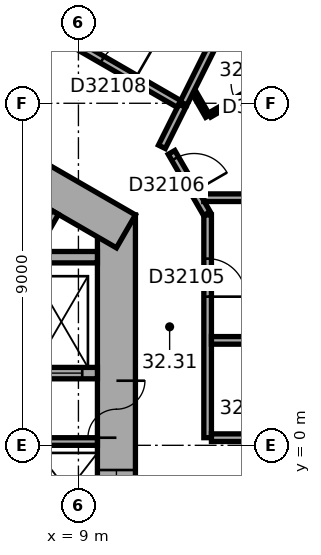
"""IFC4 building model, lengths in metres.
Left out: names, types, materials, properties, quantities, classifications, styles, units other than length and angle.
Written with IfcOpenShell. Run it as: python <this file> out.ifc"""

import sys

from ifc_helpers import new_model, si_unit, direction, frame, frame_2d, origin, place, context, subcontext, project, spatial, rectangle, extrude, element, fill, save


model = new_model("IFC4")
c1 = context("Model", 3, precision=1e-05, world=origin(), true_north=direction((0.0, 1.0)))
c2 = subcontext(c1, "Body", "Model", "MODEL_VIEW")
j1 = project(units=[si_unit("LENGTHUNIT", "METRE"), si_unit("PLANEANGLEUNIT", "RADIAN")], contexts=[c1])
p1 = place(None, origin())
s1 = spatial("IfcSite", under=j1, at=p1, CompositionType="ELEMENT")
p2 = place(p1, origin())
s2 = spatial("IfcBuilding", under=s1, at=p2, CompositionType="ELEMENT")
p3 = place(p2, frame((0.0, 0.0, 131.8)))
s3 = spatial("IfcBuildingStorey", under=s2, at=p3, CompositionType="ELEMENT", Elevation=131.8)
p4 = place(p3, frame((10.0, -6.062, 0.0), z_axis=(0.0, 0.0, 1.0), x_axis=(0.0, 1.0, 0.0)))
e1 = element("IfcWall", 1, at=p4, inside=s3, PredefinedType="SHEAR", context=c2, shape_type="SweptSolid", body=[
    extrude(rectangle(XDim=12.125, YDim=1.0, at=frame_2d((6.062, 0.0))), origin(), (0.0, 0.0, 1.0), 3.7),
])
p5 = place(p4, frame((6.262, 0.0, 0.0)))
e2 = element("IfcOpeningElement", 2, at=p5, cuts=e1, PredefinedType="OPENING", context=c2, shape_type="SweptSolid", body=[
    extrude(rectangle(XDim=1.5, YDim=2.1, at=frame_2d((0.75, 1.05))), frame((0.0, 0.51, 0.0), z_axis=(0.0, -1.0, 0.0), x_axis=(1.0, 0.0, 0.0)), (0.0, 0.0, 1.0), 1.02),
])
p6 = place(p4, frame((1.712, 0.0, 0.0)))
e3 = element("IfcOpeningElement", 3, at=p6, cuts=e1, PredefinedType="OPENING", context=c2, shape_type="SweptSolid", body=[
    extrude(rectangle(XDim=1.1, YDim=2.1, at=frame_2d((0.55, 1.05))), frame((0.0, 0.51, 0.0), z_axis=(0.0, -1.0, 0.0), x_axis=(1.0, 0.0, 0.0)), (0.0, 0.0, 1.0), 1.02),
])
p7 = place(p4, frame((4.312, 0.0, 0.0)))
e4 = element("IfcOpeningElement", 4, at=p7, cuts=e1, PredefinedType="OPENING", context=c2, shape_type="SweptSolid", body=[
    extrude(rectangle(XDim=1.1, YDim=2.1, at=frame_2d((0.55, 1.05))), frame((0.0, 0.51, 0.0), z_axis=(0.0, -1.0, 0.0), x_axis=(1.0, 0.0, 0.0)), (0.0, 0.0, 1.0), 1.02),
])
p8 = place(p3, frame((10.25, 5.629, 0.0), z_axis=(0.0, 0.0, 1.0), x_axis=(-0.866022616891, 0.50000482701, 0.0)))
e5 = element("IfcWall", 5, at=p8, inside=s3, PredefinedType="SHEAR", context=c2, shape_type="SweptSolid", body=[
    extrude(rectangle(XDim=12.125, YDim=1.0, at=frame_2d((6.062, 0.0))), origin(), (0.0, 0.0, 1.0), 3.7),
])
p9 = place(p8, frame((2.612, 0.0, 0.0)))
e6 = element("IfcOpeningElement", 6, at=p9, cuts=e5, PredefinedType="OPENING", context=c2, shape_type="SweptSolid", body=[
    extrude(rectangle(XDim=1.1, YDim=2.1, at=frame_2d((0.55, 1.05))), frame((0.0, 0.51, 0.0), z_axis=(0.0, -1.0, 0.0), x_axis=(1.0, 0.0, 0.0)), (0.0, 0.0, 1.0), 1.02),
])
p10 = place(p8, frame((5.212, 0.0, 0.0)))
e7 = element("IfcOpeningElement", 7, at=p10, cuts=e5, PredefinedType="OPENING", context=c2, shape_type="SweptSolid", body=[
    extrude(rectangle(XDim=1.1, YDim=2.1, at=frame_2d((0.55, 1.05))), frame((0.0, 0.51, 0.0), z_axis=(0.0, -1.0, 0.0), x_axis=(1.0, 0.0, 0.0)), (0.0, 0.0, 1.0), 1.02),
])
p11 = place(p8, frame((7.812, 0.0, 0.0)))
e8 = element("IfcOpeningElement", 8, at=p11, cuts=e5, PredefinedType="OPENING", context=c2, shape_type="SweptSolid", body=[
    extrude(rectangle(XDim=1.1, YDim=2.1, at=frame_2d((0.55, 1.05))), frame((0.0, 0.51, 0.0), z_axis=(0.0, -1.0, 0.0), x_axis=(1.0, 0.0, 0.0)), (0.0, 0.0, 1.0), 1.02),
])
for number, where, z_axis, x_axis in (
    (9, (7.3, 0.1, 0.0), (0.0, 0.0, 1.0), (1.0, 0.0, 0.0)),
    (10, (7.287, 4.222, 0.0), (0.0, 0.0, 1.0), (0.5, 0.866, 0.0)),
):
    element("IfcWall", number, at=place(p3, frame(where, z_axis=z_axis, x_axis=x_axis)), inside=s3, PredefinedType="PARTITIONING", context=c2, shape_type="SweptSolid", body=[
        extrude(rectangle(XDim=2.2, YDim=0.2, at=frame_2d((1.1, 0.0))), origin(), (0.0, 0.0, 1.0), 3.42),
    ])
p12 = place(p3, frame((7.3, 1.9, 0.0), z_axis=(0.0, 0.0, 1.0), x_axis=(1.0, 0.0, 0.0)))
e11 = element("IfcWall", 11, at=p12, inside=s3, PredefinedType="SHEAR", context=c2, shape_type="SweptSolid", body=[
    extrude(rectangle(XDim=2.2, YDim=0.3, at=frame_2d((1.1, 0.0))), origin(), (0.0, 0.0, 1.0), 3.42),
])
p13 = place(p12, frame((0.7, 0.0, 0.0)))
e12 = element("IfcOpeningElement", 12, at=p13, cuts=e11, PredefinedType="OPENING", context=c2, shape_type="SweptSolid", body=[
    extrude(rectangle(XDim=1.1, YDim=2.1, at=frame_2d((0.55, 1.05))), frame((0.0, 0.16, 0.0), z_axis=(0.0, -1.0, 0.0), x_axis=(1.0, 0.0, 0.0)), (0.0, 0.0, 1.0), 0.32),
])
p14 = place(p3, frame((7.3, 4.95, 0.0), z_axis=(0.0, 0.0, 1.0), x_axis=(1.0, 0.0, 0.0)))
e13 = element("IfcWall", 13, at=p14, inside=s3, PredefinedType="SHEAR", context=c2, shape_type="SweptSolid", body=[
    extrude(rectangle(XDim=2.2, YDim=0.3, at=frame_2d((1.1, 0.0))), origin(), (0.0, 0.0, 1.0), 3.42),
])
p15 = place(p3, frame((11.196, 7.854, 0.0), z_axis=(0.0, 0.0, 1.0), x_axis=(0.446241040303, 0.894912808015, 0.0)))
e14 = element("IfcWall", 14, at=p15, inside=s3, PredefinedType="PARTITIONING", context=c2, shape_type="SweptSolid", body=[
    extrude(rectangle(XDim=1.205, YDim=0.2, at=frame_2d((0.603, 0.0))), origin(), (0.0, 0.0, 1.0), 3.42),
])
p16 = place(p3, frame((11.646, 8.981, 0.0), z_axis=(0.0, 0.0, 1.0), x_axis=(-0.866027142779, 0.499996987961, 0.0)))
e15 = element("IfcWall", 15, at=p16, inside=s3, PredefinedType="PARTITIONING", context=c2, shape_type="SweptSolid", body=[
    extrude(rectangle(XDim=9.597, YDim=0.2, at=frame_2d((4.798, 0.0))), origin(), (0.0, 0.0, 1.0), 3.42),
])
p17 = place(p16, frame((1.331, 0.0, 0.0)))
e16 = element("IfcOpeningElement", 16, at=p17, cuts=e15, PredefinedType="OPENING", context=c2, shape_type="SweptSolid", body=[
    extrude(rectangle(XDim=1.0, YDim=2.1, at=frame_2d((0.5, 1.05))), frame((0.0, 0.11, 0.0), z_axis=(0.0, -1.0, 0.0), x_axis=(1.0, 0.0, 0.0)), (0.0, 0.0, 1.0), 0.22),
])
p18 = place(p16, frame((5.042, 0.0, 0.0)))
e17 = element("IfcOpeningElement", 17, at=p18, cuts=e15, PredefinedType="OPENING", context=c2, shape_type="SweptSolid", body=[
    extrude(rectangle(XDim=1.0, YDim=2.1, at=frame_2d((0.5, 1.05))), frame((0.0, 0.11, 0.0), z_axis=(0.0, -1.0, 0.0), x_axis=(1.0, 0.0, 0.0)), (0.0, 0.0, 1.0), 0.22),
])
p19 = place(p16, frame((8.01, 0.0, 0.0)))
e18 = element("IfcOpeningElement", 18, at=p19, cuts=e15, PredefinedType="OPENING", context=c2, shape_type="SweptSolid", body=[
    extrude(rectangle(XDim=1.0, YDim=2.1, at=frame_2d((0.5, 1.05))), frame((0.0, 0.11, 0.0), z_axis=(0.0, -1.0, 0.0), x_axis=(1.0, 0.0, 0.0)), (0.0, 0.0, 1.0), 0.22),
])
p20 = place(p3, frame((12.38, 6.097, 0.0), z_axis=(0.0, 0.0, 1.0), x_axis=(-0.499964847546, 0.866045698112, 0.0)))
e19 = element("IfcWall", 19, at=p20, inside=s3, PredefinedType="PARTITIONING", context=c2, shape_type="SweptSolid", body=[
    extrude(rectangle(XDim=1.86, YDim=0.2, at=frame_2d((0.93, 0.0))), origin(), (0.0, 0.0, 1.0), 3.42),
])
p21 = place(p20, frame((0.672, 0.0, 0.0)))
e20 = element("IfcOpeningElement", 20, at=p21, cuts=e19, PredefinedType="OPENING", context=c2, shape_type="SweptSolid", body=[
    extrude(rectangle(XDim=1.0, YDim=2.1, at=frame_2d((0.5, 1.05))), frame((0.0, 0.11, 0.0), z_axis=(0.0, -1.0, 0.0), x_axis=(1.0, 0.0, 0.0)), (0.0, 0.0, 1.0), 0.22),
])
p22 = place(p3, frame((12.4, 0.201, 0.0), z_axis=(0.0, 0.0, 1.0), x_axis=(0.0, 1.0, 0.0)))
e21 = element("IfcWall", 21, at=p22, inside=s3, PredefinedType="PARTITIONING", context=c2, shape_type="SweptSolid", body=[
    extrude(rectangle(XDim=5.861, YDim=0.2, at=frame_2d((2.931, 0.0))), origin(), (0.0, 0.0, 1.0), 3.42),
])
p23 = place(p22, frame((3.711, 0.0, 0.0)))
e22 = element("IfcOpeningElement", 22, at=p23, cuts=e21, PredefinedType="OPENING", context=c2, shape_type="SweptSolid", body=[
    extrude(rectangle(XDim=1.0, YDim=2.1, at=frame_2d((0.5, 1.05))), frame((0.0, 0.11, 0.0), z_axis=(0.0, -1.0, 0.0), x_axis=(1.0, 0.0, 0.0)), (0.0, 0.0, 1.0), 0.22),
])
p24 = place(p3, frame((12.401, 8.661, 0.0), z_axis=(0.0, 0.0, 1.0), x_axis=(-0.499831418649, 0.866122712398, 0.0)))
e23 = element("IfcWall", 23, at=p24, inside=s3, PredefinedType="PARTITIONING", context=c2, shape_type="SweptSolid", body=[
    extrude(rectangle(XDim=0.711, YDim=0.12, at=frame_2d((0.355, 0.0))), origin(), (0.0, 0.0, 1.0), 3.42),
])
p25 = place(p3, frame((13.501, 0.201, 0.0), z_axis=(0.0, 0.0, 1.0), x_axis=(-1.0, 0.0, 0.0)))
e24 = element("IfcWall", 24, at=p25, inside=s3, PredefinedType="PARTITIONING", context=c2, shape_type="SweptSolid", body=[
    extrude(rectangle(XDim=1.001, YDim=0.2, at=frame_2d((0.5, 0.0))), origin(), (0.0, 0.0, 1.0), 3.42),
])
p26 = place(p3, frame((14.601, 9.931, 0.0), z_axis=(0.0, 0.0, 1.0), x_axis=(-0.866023285932, -0.50000366821, 0.0)))
e25 = element("IfcWall", 25, at=p26, inside=s3, PredefinedType="PARTITIONING", context=c2, shape_type="SweptSolid", body=[
    extrude(rectangle(XDim=2.48, YDim=0.12, at=frame_2d((1.24, 0.0))), origin(), (0.0, 0.0, 1.0), 3.42),
])
p27 = place(p26, frame((0.79, 0.0, 0.0)))
e26 = element("IfcOpeningElement", 26, at=p27, cuts=e25, PredefinedType="OPENING", context=c2, shape_type="SweptSolid", body=[
    extrude(rectangle(XDim=0.9, YDim=2.1, at=frame_2d((0.45, 1.05))), frame((0.0, 0.07, 0.0), z_axis=(0.0, -1.0, 0.0), x_axis=(1.0, 0.0, 0.0)), (0.0, 0.0, 1.0), 0.14),
])
p28 = place(p3, frame((15.09, 15.663, 0.0), z_axis=(0.0, 0.0, 1.0), x_axis=(-0.446203977428, -0.89493128816, 0.0)))
e27 = element("IfcWall", 27, at=p28, inside=s3, PredefinedType="PARTITIONING", context=c2, shape_type="SweptSolid", body=[
    extrude(rectangle(XDim=7.45, YDim=0.2, at=frame_2d((3.725, 0.0))), origin(), (0.0, 0.0, 1.0), 3.42),
])
p29 = place(p3, frame((20.75, 2.761, 0.0), z_axis=(0.0, 0.0, 1.0), x_axis=(-1.0, 0.0, 0.0)))
e28 = element("IfcWall", 28, at=p29, inside=s3, PredefinedType="PARTITIONING", context=c2, shape_type="SweptSolid", body=[
    extrude(rectangle(XDim=8.25, YDim=0.2, at=frame_2d((4.125, 0.0))), origin(), (0.0, 0.0, 1.0), 3.42),
])
p30 = place(p3, frame((20.75, 6.515, 0.0), z_axis=(0.0, 0.0, 1.0), x_axis=(-1.0, 0.0, 0.0)))
e29 = element("IfcWall", 29, at=p30, inside=s3, PredefinedType="PARTITIONING", context=c2, shape_type="SweptSolid", body=[
    extrude(rectangle(XDim=8.452, YDim=0.2, at=frame_2d((4.226, 0.0))), origin(), (0.0, 0.0, 1.0), 3.42),
])
p31 = place(p5, origin())
e30 = element("IfcDoor", 30, at=p31, inside=s3, OperationType="DOUBLE_DOOR_SINGLE_SWING", PredefinedType="DOOR", context=c2, shape_type="SweptSolid", body=[
    extrude(rectangle(XDim=1.5, YDim=2.1, at=frame_2d((0.75, 1.05))), frame((0.0, 0.025, 0.0), z_axis=(0.0, -1.0, 0.0), x_axis=(1.0, 0.0, 0.0)), (0.0, 0.0, 1.0), 0.05),
])
fill(e2, e30)
p32 = place(p13, origin())
e31 = element("IfcDoor", 31, at=p32, inside=s3, OperationType="DOUBLE_DOOR_SLIDING", PredefinedType="DOOR", context=c2, shape_type="SweptSolid", body=[
    extrude(rectangle(XDim=1.1, YDim=2.1, at=frame_2d((0.55, 1.05))), frame((0.0, 0.025, 0.0), z_axis=(0.0, -1.0, 0.0), x_axis=(1.0, 0.0, 0.0)), (0.0, 0.0, 1.0), 0.05),
])
fill(e12, e31)
p33 = place(p7, origin())
e32 = element("IfcDoor", 32, at=p33, inside=s3, OperationType="DOUBLE_DOOR_SLIDING", PredefinedType="DOOR", context=c2, shape_type="SweptSolid", body=[
    extrude(rectangle(XDim=1.1, YDim=2.1, at=frame_2d((0.55, 1.05))), frame((0.0, 0.025, 0.0), z_axis=(0.0, -1.0, 0.0), x_axis=(1.0, 0.0, 0.0)), (0.0, 0.0, 1.0), 0.05),
])
fill(e4, e32)
p34 = place(p23, origin())
e33 = element("IfcDoor", 33, at=p34, inside=s3, OperationType="SINGLE_SWING_LEFT", PredefinedType="DOOR", context=c2, shape_type="SweptSolid", body=[
    extrude(rectangle(XDim=1.0, YDim=2.1, at=frame_2d((0.5, 1.05))), frame((0.0, 0.025, 0.0), z_axis=(0.0, -1.0, 0.0), x_axis=(1.0, 0.0, 0.0)), (0.0, 0.0, 1.0), 0.05),
])
fill(e22, e33)
p35 = place(p21, origin())
e34 = element("IfcDoor", 34, at=p35, inside=s3, OperationType="SINGLE_SWING_LEFT", PredefinedType="DOOR", context=c2, shape_type="SweptSolid", body=[
    extrude(rectangle(XDim=1.0, YDim=2.1, at=frame_2d((0.5, 1.05))), frame((0.0, 0.025, 0.0), z_axis=(0.0, -1.0, 0.0), x_axis=(1.0, 0.0, 0.0)), (0.0, 0.0, 1.0), 0.05),
])
fill(e20, e34)
p36 = place(p27, origin())
e35 = element("IfcDoor", 35, at=p36, inside=s3, OperationType="SINGLE_SWING_LEFT", PredefinedType="DOOR", context=c2, shape_type="SweptSolid", body=[
    extrude(rectangle(XDim=0.9, YDim=2.1, at=frame_2d((0.45, 1.05))), frame((0.0, 0.025, 0.0), z_axis=(0.0, -1.0, 0.0), x_axis=(1.0, 0.0, 0.0)), (0.0, 0.0, 1.0), 0.05),
])
fill(e26, e35)
p37 = place(p17, origin())
e36 = element("IfcDoor", 36, at=p37, inside=s3, OperationType="SINGLE_SWING_LEFT", PredefinedType="DOOR", context=c2, shape_type="SweptSolid", body=[
    extrude(rectangle(XDim=1.0, YDim=2.1, at=frame_2d((0.5, 1.05))), frame((0.0, 0.025, 0.0), z_axis=(0.0, -1.0, 0.0), x_axis=(1.0, 0.0, 0.0)), (0.0, 0.0, 1.0), 0.05),
])
fill(e16, e36)
save(model, sys.argv[1])
